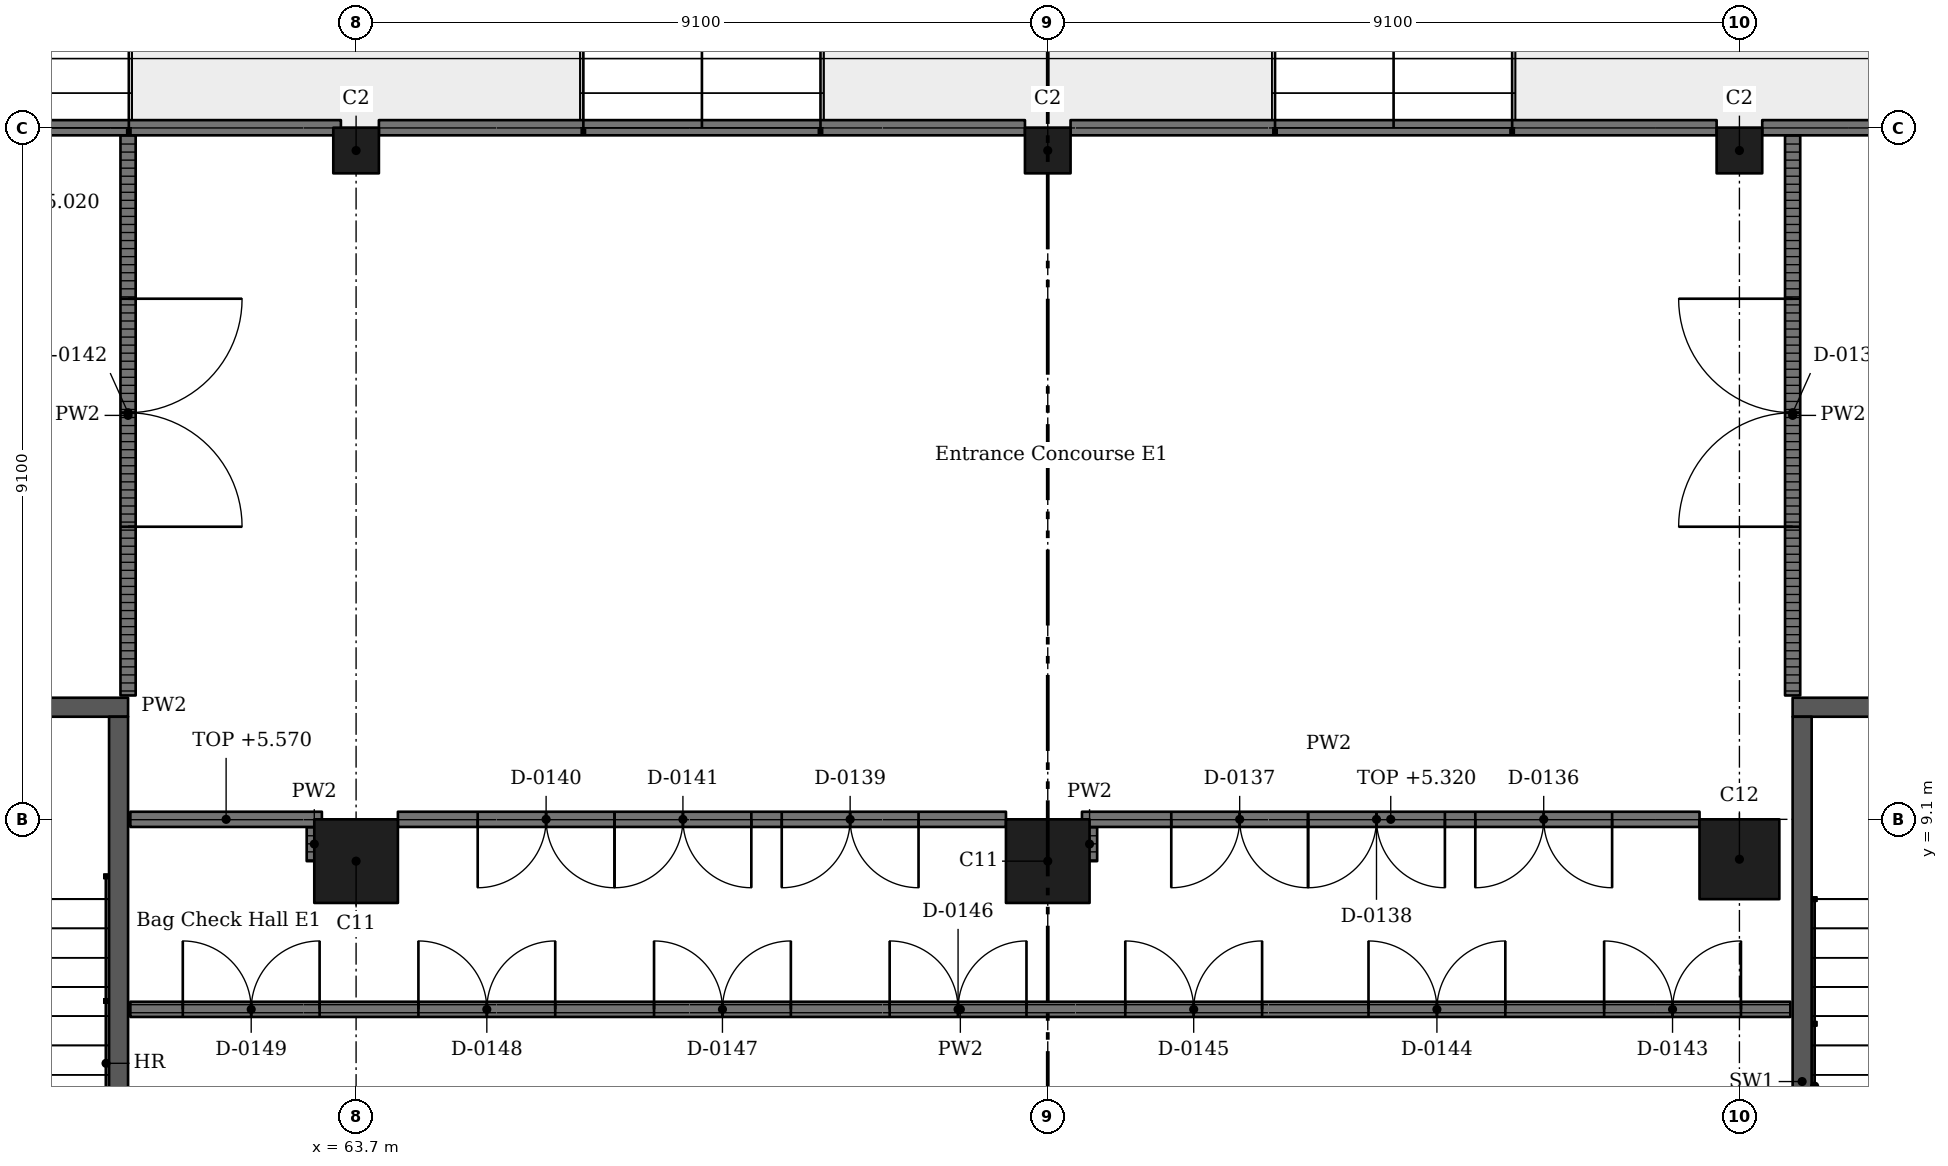
"""IFC4 building model, lengths in metres.
Left out: names, types, materials, properties, quantities, classifications, styles, units other than length and angle.
Written with IfcOpenShell. Run it as: python <this file> out.ifc"""

import sys

from ifc_helpers import new_model, si_unit, direction, frame, frame_2d, origin, origin_2d, place, context, subcontext, project, spatial, rectangle, extrude, element, fill, save


model = new_model("IFC4")
c1 = context("Model", 3, precision=1e-05, world=origin(), true_north=direction((0.0, 1.0)))
c2 = subcontext(c1, "Body", "Model", "MODEL_VIEW")
j1 = project(units=[si_unit("LENGTHUNIT", "METRE"), si_unit("PLANEANGLEUNIT", "RADIAN")], contexts=[c1])
p1 = place(None, origin())
s1 = spatial("IfcSite", under=j1, at=p1, CompositionType="ELEMENT")
p2 = place(p1, origin())
s2 = spatial("IfcBuilding", under=s1, at=p2, CompositionType="ELEMENT")
p3 = place(p2, origin())
s3 = spatial("IfcBuildingStorey", under=s2, at=p3, CompositionType="ELEMENT", Elevation=0.0)
p4 = place(p3, frame((63.7, 8.55, -0.4), z_axis=(0.0, 0.0, 1.0), x_axis=(1.0, 0.0, 0.0)))
e1 = element("IfcColumn", 1, at=p4, inside=s3, PredefinedType="COLUMN", context=c2, shape_type="SweptSolid", body=[
    extrude(rectangle(XDim=1.1, YDim=1.1, at=origin_2d()), origin(), (0.0, 0.0, 1.0), 6.77),
])
p5 = place(p3, frame((63.7, 17.9, -0.4), z_axis=(0.0, 0.0, 1.0), x_axis=(1.0, 0.0, 0.0)))
e2 = element("IfcColumn", 2, at=p5, inside=s3, PredefinedType="COLUMN", context=c2, shape_type="SweptSolid", body=[
    extrude(rectangle(XDim=0.6, YDim=0.6, at=origin_2d()), origin(), (0.0, 0.0, 1.0), 6.77),
])
p6 = place(p3, frame((72.8, 8.55, -0.4), z_axis=(0.0, 0.0, 1.0), x_axis=(1.0, 0.0, 0.0)))
e3 = element("IfcColumn", 3, at=p6, inside=s3, PredefinedType="COLUMN", context=c2, shape_type="SweptSolid", body=[
    extrude(rectangle(XDim=1.1, YDim=1.1, at=origin_2d()), origin(), (0.0, 0.0, 1.0), 6.77),
])
p7 = place(p3, frame((72.8, 17.9, -0.4), z_axis=(0.0, 0.0, 1.0), x_axis=(1.0, 0.0, 0.0)))
e4 = element("IfcColumn", 4, at=p7, inside=s3, PredefinedType="COLUMN", context=c2, shape_type="SweptSolid", body=[
    extrude(rectangle(XDim=0.6, YDim=0.6, at=origin_2d()), origin(), (0.0, 0.0, 1.0), 6.77),
])
p8 = place(p3, frame((81.9, 8.575, -0.4), z_axis=(0.0, 0.0, 1.0), x_axis=(1.0, 0.0, 0.0)))
e5 = element("IfcColumn", 5, at=p8, inside=s3, PredefinedType="COLUMN", context=c2, shape_type="SweptSolid", body=[
    extrude(rectangle(XDim=1.05, YDim=1.05, at=origin_2d()), origin(), (0.0, 0.0, 1.0), 6.77),
])
p9 = place(p3, frame((81.9, 17.9, -0.4), z_axis=(0.0, 0.0, 1.0), x_axis=(1.0, 0.0, 0.0)))
e6 = element("IfcColumn", 6, at=p9, inside=s3, PredefinedType="COLUMN", context=c2, shape_type="SweptSolid", body=[
    extrude(rectangle(XDim=0.6, YDim=0.6, at=origin_2d()), origin(), (0.0, 0.0, 1.0), 6.77),
])
p10 = place(p3, frame((60.7, 10.575, -0.4), z_axis=(0.0, 0.0, 1.0), x_axis=(-1.0, 0.0, 0.0)))
e7 = element("IfcWall", 7, at=p10, inside=s3, PredefinedType="SHEAR", context=c2, shape_type="SweptSolid", body=[
    extrude(rectangle(XDim=5.4, YDim=0.25, at=frame_2d((2.7, 0.0))), origin(), (0.0, 0.0, 1.0), 6.77),
])
p11 = place(p10, frame((1.5, 0.0, 0.4)))
e8 = element("IfcOpeningElement", 8, at=p11, cuts=e7, PredefinedType="OPENING", context=c2, shape_type="SweptSolid", body=[
    extrude(rectangle(XDim=2.4, YDim=2.1, at=frame_2d((1.2, 1.05))), frame((0.0, 0.135, 0.0), z_axis=(0.0, -1.0, 0.0), x_axis=(1.0, 0.0, 0.0)), (0.0, 0.0, 1.0), 0.27),
])
p12 = place(p3, frame((60.575, 10.45, -0.4), z_axis=(0.0, 0.0, 1.0), x_axis=(0.0, -1.0, 0.0)))
e9 = element("IfcWall", 9, at=p12, inside=s3, PredefinedType="SHEAR", context=c2, shape_type="SweptSolid", body=[
    extrude(rectangle(XDim=9.6, YDim=0.25, at=frame_2d((4.8, 0.0))), origin(), (0.0, 0.0, 1.0), 6.77),
])
p13 = place(p3, frame((88.0, 10.575, -0.4), z_axis=(0.0, 0.0, 1.0), x_axis=(-1.0, 0.0, 0.0)))
e10 = element("IfcWall", 10, at=p13, inside=s3, PredefinedType="SHEAR", context=c2, shape_type="SweptSolid", body=[
    extrude(rectangle(XDim=5.4, YDim=0.25, at=frame_2d((2.7, 0.0))), origin(), (0.0, 0.0, 1.0), 6.77),
])
p14 = place(p13, frame((1.5, 0.0, 0.4)))
e11 = element("IfcOpeningElement", 11, at=p14, cuts=e10, PredefinedType="OPENING", context=c2, shape_type="SweptSolid", body=[
    extrude(rectangle(XDim=2.4, YDim=2.1, at=frame_2d((1.2, 1.05))), frame((0.0, 0.135, 0.0), z_axis=(0.0, -1.0, 0.0), x_axis=(1.0, 0.0, 0.0)), (0.0, 0.0, 1.0), 0.27),
])
p15 = place(p3, frame((82.725, 10.45, -0.4), z_axis=(0.0, 0.0, 1.0), x_axis=(0.0, -1.0, 0.0)))
e12 = element("IfcWall", 12, at=p15, inside=s3, PredefinedType="SHEAR", context=c2, shape_type="SweptSolid", body=[
    extrude(rectangle(XDim=9.6, YDim=0.25, at=frame_2d((4.8, 0.0))), origin(), (0.0, 0.0, 1.0), 6.77),
])
p16 = place(p3, frame((54.9, 18.2, 0.0), z_axis=(0.0, 0.0, 1.0), x_axis=(1.0, 0.0, 0.0)))
e13 = element("IfcWall", 13, at=p16, inside=s3, PredefinedType="PARTITIONING", context=c2, shape_type="SweptSolid", body=[
    extrude(rectangle(XDim=8.6, YDim=0.2, at=frame_2d((4.3, 0.0))), origin(), (0.0, 0.0, 1.0), 5.02),
])
p17 = place(p3, frame((60.7, 18.1, 0.0), z_axis=(0.0, 0.0, 1.0), x_axis=(0.0, -1.0, 0.0)))
e14 = element("IfcWall", 14, at=p17, inside=s3, PredefinedType="PARTITIONING", context=c2, shape_type="SweptSolid", body=[
    extrude(rectangle(XDim=7.37, YDim=0.2, at=frame_2d((3.685, 0.0))), origin(), (0.0, 0.0, 1.0), 6.02),
])
p18 = place(p17, frame((2.15, 0.0, 0.0)))
e15 = element("IfcOpeningElement", 15, at=p18, cuts=e14, PredefinedType="OPENING", context=c2, shape_type="SweptSolid", body=[
    extrude(rectangle(XDim=3.0, YDim=2.4, at=frame_2d((1.5, 1.2))), frame((0.0, 0.11, 0.0), z_axis=(0.0, -1.0, 0.0), x_axis=(1.0, 0.0, 0.0)), (0.0, 0.0, 1.0), 0.22),
])
p19 = place(p3, frame((63.15, 8.55, 0.0), z_axis=(0.0, 0.0, 1.0), x_axis=(0.0, 1.0, 0.0)))
e16 = element("IfcWall", 16, at=p19, inside=s3, PredefinedType="PARTITIONING", context=c2, shape_type="SweptSolid", body=[
    extrude(rectangle(XDim=0.45, YDim=0.2, at=frame_2d((0.225, 0.0))), origin(), (0.0, 0.0, 1.0), 6.02),
])
p20 = place(p3, frame((63.25, 9.1, 0.0), z_axis=(0.0, 0.0, 1.0), x_axis=(-1.0, 0.0, 0.0)))
e17 = element("IfcWall", 17, at=p20, inside=s3, PredefinedType="PARTITIONING", context=c2, shape_type="SweptSolid", body=[
    extrude(rectangle(XDim=2.52, YDim=0.2, at=frame_2d((1.26, 0.0))), origin(), (0.0, 0.0, 1.0), 5.57),
])
p21 = place(p3, frame((64.0, 18.2, 0.0), z_axis=(0.0, 0.0, 1.0), x_axis=(1.0, 0.0, 0.0)))
e18 = element("IfcWall", 18, at=p21, inside=s3, PredefinedType="PARTITIONING", context=c2, shape_type="SweptSolid", body=[
    extrude(rectangle(XDim=8.5, YDim=0.2, at=frame_2d((4.25, 0.0))), origin(), (0.0, 0.0, 1.0), 5.02),
])
p22 = place(p3, frame((72.25, 9.1, 0.0), z_axis=(0.0, 0.0, 1.0), x_axis=(-1.0, 0.0, 0.0)))
e19 = element("IfcWall", 19, at=p22, inside=s3, PredefinedType="PARTITIONING", context=c2, shape_type="SweptSolid", body=[
    extrude(rectangle(XDim=8.0, YDim=0.2, at=frame_2d((4.0, 0.0))), origin(), (0.0, 0.0, 1.0), 5.32),
])
p23 = place(p22, frame((1.15, 0.0, 0.0)))
e20 = element("IfcOpeningElement", 20, at=p23, cuts=e19, PredefinedType="OPENING", context=c2, shape_type="SweptSolid", body=[
    extrude(rectangle(XDim=1.8, YDim=2.4, at=frame_2d((0.9, 1.2))), frame((0.0, 0.11, 0.0), z_axis=(0.0, -1.0, 0.0), x_axis=(1.0, 0.0, 0.0)), (0.0, 0.0, 1.0), 0.22),
])
p24 = place(p22, frame((5.15, 0.0, 0.0)))
e21 = element("IfcOpeningElement", 21, at=p24, cuts=e19, PredefinedType="OPENING", context=c2, shape_type="SweptSolid", body=[
    extrude(rectangle(XDim=1.8, YDim=2.4, at=frame_2d((0.9, 1.2))), frame((0.0, 0.11, 0.0), z_axis=(0.0, -1.0, 0.0), x_axis=(1.0, 0.0, 0.0)), (0.0, 0.0, 1.0), 0.22),
])
p25 = place(p22, frame((3.35, 0.0, 0.0)))
e22 = element("IfcOpeningElement", 22, at=p25, cuts=e19, PredefinedType="OPENING", context=c2, shape_type="SweptSolid", body=[
    extrude(rectangle(XDim=1.8, YDim=2.4, at=frame_2d((0.9, 1.2))), frame((0.0, 0.11, 0.0), z_axis=(0.0, -1.0, 0.0), x_axis=(1.0, 0.0, 0.0)), (0.0, 0.0, 1.0), 0.22),
])
p26 = place(p3, frame((73.1, 18.2, 0.0), z_axis=(0.0, 0.0, 1.0), x_axis=(1.0, 0.0, 0.0)))
e23 = element("IfcWall", 23, at=p26, inside=s3, PredefinedType="PARTITIONING", context=c2, shape_type="SweptSolid", body=[
    extrude(rectangle(XDim=8.5, YDim=0.2, at=frame_2d((4.25, 0.0))), origin(), (0.0, 0.0, 1.0), 5.02),
])
p27 = place(p3, frame((73.35, 9.0, 0.0), z_axis=(0.0, 0.0, 1.0), x_axis=(0.0, -1.0, 0.0)))
e24 = element("IfcWall", 24, at=p27, inside=s3, PredefinedType="PARTITIONING", context=c2, shape_type="SweptSolid", body=[
    extrude(rectangle(XDim=0.45, YDim=0.2, at=frame_2d((0.225, 0.0))), origin(), (0.0, 0.0, 1.0), 6.02),
])
p28 = place(p3, frame((81.375, 9.1, 0.0), z_axis=(0.0, 0.0, 1.0), x_axis=(-1.0, 0.0, 0.0)))
e25 = element("IfcWall", 25, at=p28, inside=s3, PredefinedType="PARTITIONING", context=c2, shape_type="SweptSolid", body=[
    extrude(rectangle(XDim=8.125, YDim=0.2, at=frame_2d((4.062, 0.0))), origin(), (0.0, 0.0, 1.0), 5.32),
])
p29 = place(p28, frame((1.15, 0.0, 0.0)))
e26 = element("IfcOpeningElement", 26, at=p29, cuts=e25, PredefinedType="OPENING", context=c2, shape_type="SweptSolid", body=[
    extrude(rectangle(XDim=1.8, YDim=2.4, at=frame_2d((0.9, 1.2))), frame((0.0, 0.11, 0.0), z_axis=(0.0, -1.0, 0.0), x_axis=(1.0, 0.0, 0.0)), (0.0, 0.0, 1.0), 0.22),
])
p30 = place(p28, frame((5.15, 0.0, 0.0)))
e27 = element("IfcOpeningElement", 27, at=p30, cuts=e25, PredefinedType="OPENING", context=c2, shape_type="SweptSolid", body=[
    extrude(rectangle(XDim=1.8, YDim=2.4, at=frame_2d((0.9, 1.2))), frame((0.0, 0.11, 0.0), z_axis=(0.0, -1.0, 0.0), x_axis=(1.0, 0.0, 0.0)), (0.0, 0.0, 1.0), 0.22),
])
p31 = place(p28, frame((3.35, 0.0, 0.0)))
e28 = element("IfcOpeningElement", 28, at=p31, cuts=e25, PredefinedType="OPENING", context=c2, shape_type="SweptSolid", body=[
    extrude(rectangle(XDim=1.8, YDim=2.4, at=frame_2d((0.9, 1.2))), frame((0.0, 0.11, 0.0), z_axis=(0.0, -1.0, 0.0), x_axis=(1.0, 0.0, 0.0)), (0.0, 0.0, 1.0), 0.22),
])
p32 = place(p3, frame((82.2, 18.2, 0.0), z_axis=(0.0, 0.0, 1.0), x_axis=(1.0, 0.0, 0.0)))
e29 = element("IfcWall", 29, at=p32, inside=s3, PredefinedType="PARTITIONING", context=c2, shape_type="SweptSolid", body=[
    extrude(rectangle(XDim=8.5, YDim=0.2, at=frame_2d((4.25, 0.0))), origin(), (0.0, 0.0, 1.0), 5.02),
])
p33 = place(p3, frame((82.57, 6.6, 0.0), z_axis=(0.0, 0.0, 1.0), x_axis=(-1.0, 0.0, 0.0)))
e30 = element("IfcWall", 30, at=p33, inside=s3, PredefinedType="PARTITIONING", context=c2, shape_type="SweptSolid", body=[
    extrude(rectangle(XDim=21.84, YDim=0.2, at=frame_2d((10.92, 0.0))), origin(), (0.0, 0.0, 1.0), 6.02),
])
p34 = place(p33, frame((0.65, 0.0, 0.0)))
e31 = element("IfcOpeningElement", 31, at=p34, cuts=e30, PredefinedType="OPENING", context=c2, shape_type="SweptSolid", body=[
    extrude(rectangle(XDim=1.8, YDim=2.4, at=frame_2d((0.9, 1.2))), frame((0.0, 0.11, 0.0), z_axis=(0.0, -1.0, 0.0), x_axis=(1.0, 0.0, 0.0)), (0.0, 0.0, 1.0), 0.22),
])
p35 = place(p33, frame((3.75, 0.0, 0.0)))
e32 = element("IfcOpeningElement", 32, at=p35, cuts=e30, PredefinedType="OPENING", context=c2, shape_type="SweptSolid", body=[
    extrude(rectangle(XDim=1.8, YDim=2.4, at=frame_2d((0.9, 1.2))), frame((0.0, 0.11, 0.0), z_axis=(0.0, -1.0, 0.0), x_axis=(1.0, 0.0, 0.0)), (0.0, 0.0, 1.0), 0.22),
])
p36 = place(p33, frame((6.95, 0.0, 0.0)))
e33 = element("IfcOpeningElement", 33, at=p36, cuts=e30, PredefinedType="OPENING", context=c2, shape_type="SweptSolid", body=[
    extrude(rectangle(XDim=1.8, YDim=2.4, at=frame_2d((0.9, 1.2))), frame((0.0, 0.11, 0.0), z_axis=(0.0, -1.0, 0.0), x_axis=(1.0, 0.0, 0.0)), (0.0, 0.0, 1.0), 0.22),
])
p37 = place(p33, frame((10.05, 0.0, 0.0)))
e34 = element("IfcOpeningElement", 34, at=p37, cuts=e30, PredefinedType="OPENING", context=c2, shape_type="SweptSolid", body=[
    extrude(rectangle(XDim=1.8, YDim=2.4, at=frame_2d((0.9, 1.2))), frame((0.0, 0.11, 0.0), z_axis=(0.0, -1.0, 0.0), x_axis=(1.0, 0.0, 0.0)), (0.0, 0.0, 1.0), 0.22),
])
p38 = place(p33, frame((13.15, 0.0, 0.0)))
e35 = element("IfcOpeningElement", 35, at=p38, cuts=e30, PredefinedType="OPENING", context=c2, shape_type="SweptSolid", body=[
    extrude(rectangle(XDim=1.8, YDim=2.4, at=frame_2d((0.9, 1.2))), frame((0.0, 0.11, 0.0), z_axis=(0.0, -1.0, 0.0), x_axis=(1.0, 0.0, 0.0)), (0.0, 0.0, 1.0), 0.22),
])
p39 = place(p33, frame((16.25, 0.0, 0.0)))
e36 = element("IfcOpeningElement", 36, at=p39, cuts=e30, PredefinedType="OPENING", context=c2, shape_type="SweptSolid", body=[
    extrude(rectangle(XDim=1.8, YDim=2.4, at=frame_2d((0.9, 1.2))), frame((0.0, 0.11, 0.0), z_axis=(0.0, -1.0, 0.0), x_axis=(1.0, 0.0, 0.0)), (0.0, 0.0, 1.0), 0.22),
])
p40 = place(p33, frame((19.35, 0.0, 0.0)))
e37 = element("IfcOpeningElement", 37, at=p40, cuts=e30, PredefinedType="OPENING", context=c2, shape_type="SweptSolid", body=[
    extrude(rectangle(XDim=1.8, YDim=2.4, at=frame_2d((0.9, 1.2))), frame((0.0, 0.11, 0.0), z_axis=(0.0, -1.0, 0.0), x_axis=(1.0, 0.0, 0.0)), (0.0, 0.0, 1.0), 0.22),
])
p41 = place(p3, frame((82.6, 18.1, 0.0), z_axis=(0.0, 0.0, 1.0), x_axis=(0.0, -1.0, 0.0)))
e38 = element("IfcWall", 38, at=p41, inside=s3, PredefinedType="PARTITIONING", context=c2, shape_type="SweptSolid", body=[
    extrude(rectangle(XDim=7.37, YDim=0.2, at=frame_2d((3.685, 0.0))), origin(), (0.0, 0.0, 1.0), 6.02),
])
p42 = place(p41, frame((2.15, 0.0, 0.0)))
e39 = element("IfcOpeningElement", 39, at=p42, cuts=e38, PredefinedType="OPENING", context=c2, shape_type="SweptSolid", body=[
    extrude(rectangle(XDim=3.0, YDim=2.4, at=frame_2d((1.5, 1.2))), frame((0.0, 0.11, 0.0), z_axis=(0.0, -1.0, 0.0), x_axis=(1.0, 0.0, 0.0)), (0.0, 0.0, 1.0), 0.22),
])
p43 = place(p42, origin())
e40 = element("IfcDoor", 40, at=p43, inside=s3, OperationType="DOUBLE_DOOR_SINGLE_SWING", PredefinedType="DOOR", context=c2, shape_type="SweptSolid", body=[
    extrude(rectangle(XDim=3.0, YDim=2.4, at=frame_2d((1.5, 1.2))), frame((0.0, 0.025, 0.0), z_axis=(0.0, -1.0, 0.0), x_axis=(1.0, 0.0, 0.0)), (0.0, 0.0, 1.0), 0.05),
])
fill(e39, e40)
p44 = place(p29, origin())
e41 = element("IfcDoor", 41, at=p44, inside=s3, OperationType="DOUBLE_DOOR_SINGLE_SWING", PredefinedType="DOOR", context=c2, shape_type="SweptSolid", body=[
    extrude(rectangle(XDim=1.8, YDim=2.4, at=frame_2d((0.9, 1.2))), frame((0.0, 0.025, 0.0), z_axis=(0.0, -1.0, 0.0), x_axis=(1.0, 0.0, 0.0)), (0.0, 0.0, 1.0), 0.05),
])
fill(e26, e41)
p45 = place(p30, origin())
e42 = element("IfcDoor", 42, at=p45, inside=s3, OperationType="DOUBLE_DOOR_SINGLE_SWING", PredefinedType="DOOR", context=c2, shape_type="SweptSolid", body=[
    extrude(rectangle(XDim=1.8, YDim=2.4, at=frame_2d((0.9, 1.2))), frame((0.0, 0.025, 0.0), z_axis=(0.0, -1.0, 0.0), x_axis=(1.0, 0.0, 0.0)), (0.0, 0.0, 1.0), 0.05),
])
fill(e27, e42)
p46 = place(p31, origin())
e43 = element("IfcDoor", 43, at=p46, inside=s3, OperationType="DOUBLE_DOOR_SINGLE_SWING", PredefinedType="DOOR", context=c2, shape_type="SweptSolid", body=[
    extrude(rectangle(XDim=1.8, YDim=2.4, at=frame_2d((0.9, 1.2))), frame((0.0, 0.025, 0.0), z_axis=(0.0, -1.0, 0.0), x_axis=(1.0, 0.0, 0.0)), (0.0, 0.0, 1.0), 0.05),
])
fill(e28, e43)
p47 = place(p23, origin())
e44 = element("IfcDoor", 44, at=p47, inside=s3, OperationType="DOUBLE_DOOR_SINGLE_SWING", PredefinedType="DOOR", context=c2, shape_type="SweptSolid", body=[
    extrude(rectangle(XDim=1.8, YDim=2.4, at=frame_2d((0.9, 1.2))), frame((0.0, 0.025, 0.0), z_axis=(0.0, -1.0, 0.0), x_axis=(1.0, 0.0, 0.0)), (0.0, 0.0, 1.0), 0.05),
])
fill(e20, e44)
p48 = place(p24, origin())
e45 = element("IfcDoor", 45, at=p48, inside=s3, OperationType="DOUBLE_DOOR_SINGLE_SWING", PredefinedType="DOOR", context=c2, shape_type="SweptSolid", body=[
    extrude(rectangle(XDim=1.8, YDim=2.4, at=frame_2d((0.9, 1.2))), frame((0.0, 0.025, 0.0), z_axis=(0.0, -1.0, 0.0), x_axis=(1.0, 0.0, 0.0)), (0.0, 0.0, 1.0), 0.05),
])
fill(e21, e45)
p49 = place(p25, origin())
e46 = element("IfcDoor", 46, at=p49, inside=s3, OperationType="DOUBLE_DOOR_SINGLE_SWING", PredefinedType="DOOR", context=c2, shape_type="SweptSolid", body=[
    extrude(rectangle(XDim=1.8, YDim=2.4, at=frame_2d((0.9, 1.2))), frame((0.0, 0.025, 0.0), z_axis=(0.0, -1.0, 0.0), x_axis=(1.0, 0.0, 0.0)), (0.0, 0.0, 1.0), 0.05),
])
fill(e22, e46)
p50 = place(p18, origin())
e47 = element("IfcDoor", 47, at=p50, inside=s3, OperationType="DOUBLE_DOOR_SINGLE_SWING", PredefinedType="DOOR", context=c2, shape_type="SweptSolid", body=[
    extrude(rectangle(XDim=3.0, YDim=2.4, at=frame_2d((1.5, 1.2))), frame((0.0, 0.025, 0.0), z_axis=(0.0, -1.0, 0.0), x_axis=(1.0, 0.0, 0.0)), (0.0, 0.0, 1.0), 0.05),
])
fill(e15, e47)
p51 = place(p34, origin())
e48 = element("IfcDoor", 48, at=p51, inside=s3, OperationType="DOUBLE_DOOR_SINGLE_SWING", PredefinedType="DOOR", context=c2, shape_type="SweptSolid", body=[
    extrude(rectangle(XDim=1.8, YDim=2.4, at=frame_2d((0.9, 1.2))), frame((0.0, 0.025, 0.0), z_axis=(0.0, -1.0, 0.0), x_axis=(1.0, 0.0, 0.0)), (0.0, 0.0, 1.0), 0.05),
])
fill(e31, e48)
p52 = place(p35, origin())
e49 = element("IfcDoor", 49, at=p52, inside=s3, OperationType="DOUBLE_DOOR_SINGLE_SWING", PredefinedType="DOOR", context=c2, shape_type="SweptSolid", body=[
    extrude(rectangle(XDim=1.8, YDim=2.4, at=frame_2d((0.9, 1.2))), frame((0.0, 0.025, 0.0), z_axis=(0.0, -1.0, 0.0), x_axis=(1.0, 0.0, 0.0)), (0.0, 0.0, 1.0), 0.05),
])
fill(e32, e49)
p53 = place(p36, origin())
e50 = element("IfcDoor", 50, at=p53, inside=s3, OperationType="DOUBLE_DOOR_SINGLE_SWING", PredefinedType="DOOR", context=c2, shape_type="SweptSolid", body=[
    extrude(rectangle(XDim=1.8, YDim=2.4, at=frame_2d((0.9, 1.2))), frame((0.0, 0.025, 0.0), z_axis=(0.0, -1.0, 0.0), x_axis=(1.0, 0.0, 0.0)), (0.0, 0.0, 1.0), 0.05),
])
fill(e33, e50)
p54 = place(p37, origin())
e51 = element("IfcDoor", 51, at=p54, inside=s3, OperationType="DOUBLE_DOOR_SINGLE_SWING", PredefinedType="DOOR", context=c2, shape_type="SweptSolid", body=[
    extrude(rectangle(XDim=1.8, YDim=2.4, at=frame_2d((0.9, 1.2))), frame((0.0, 0.025, 0.0), z_axis=(0.0, -1.0, 0.0), x_axis=(1.0, 0.0, 0.0)), (0.0, 0.0, 1.0), 0.05),
])
fill(e34, e51)
p55 = place(p38, origin())
e52 = element("IfcDoor", 52, at=p55, inside=s3, OperationType="DOUBLE_DOOR_SINGLE_SWING", PredefinedType="DOOR", context=c2, shape_type="SweptSolid", body=[
    extrude(rectangle(XDim=1.8, YDim=2.4, at=frame_2d((0.9, 1.2))), frame((0.0, 0.025, 0.0), z_axis=(0.0, -1.0, 0.0), x_axis=(1.0, 0.0, 0.0)), (0.0, 0.0, 1.0), 0.05),
])
fill(e35, e52)
p56 = place(p39, origin())
e53 = element("IfcDoor", 53, at=p56, inside=s3, OperationType="DOUBLE_DOOR_SINGLE_SWING", PredefinedType="DOOR", context=c2, shape_type="SweptSolid", body=[
    extrude(rectangle(XDim=1.8, YDim=2.4, at=frame_2d((0.9, 1.2))), frame((0.0, 0.025, 0.0), z_axis=(0.0, -1.0, 0.0), x_axis=(1.0, 0.0, 0.0)), (0.0, 0.0, 1.0), 0.05),
])
fill(e36, e53)
p57 = place(p40, origin())
e54 = element("IfcDoor", 54, at=p57, inside=s3, OperationType="DOUBLE_DOOR_SINGLE_SWING", PredefinedType="DOOR", context=c2, shape_type="SweptSolid", body=[
    extrude(rectangle(XDim=1.8, YDim=2.4, at=frame_2d((0.9, 1.2))), frame((0.0, 0.025, 0.0), z_axis=(0.0, -1.0, 0.0), x_axis=(1.0, 0.0, 0.0)), (0.0, 0.0, 1.0), 0.05),
])
fill(e37, e54)
save(model, sys.argv[1])
